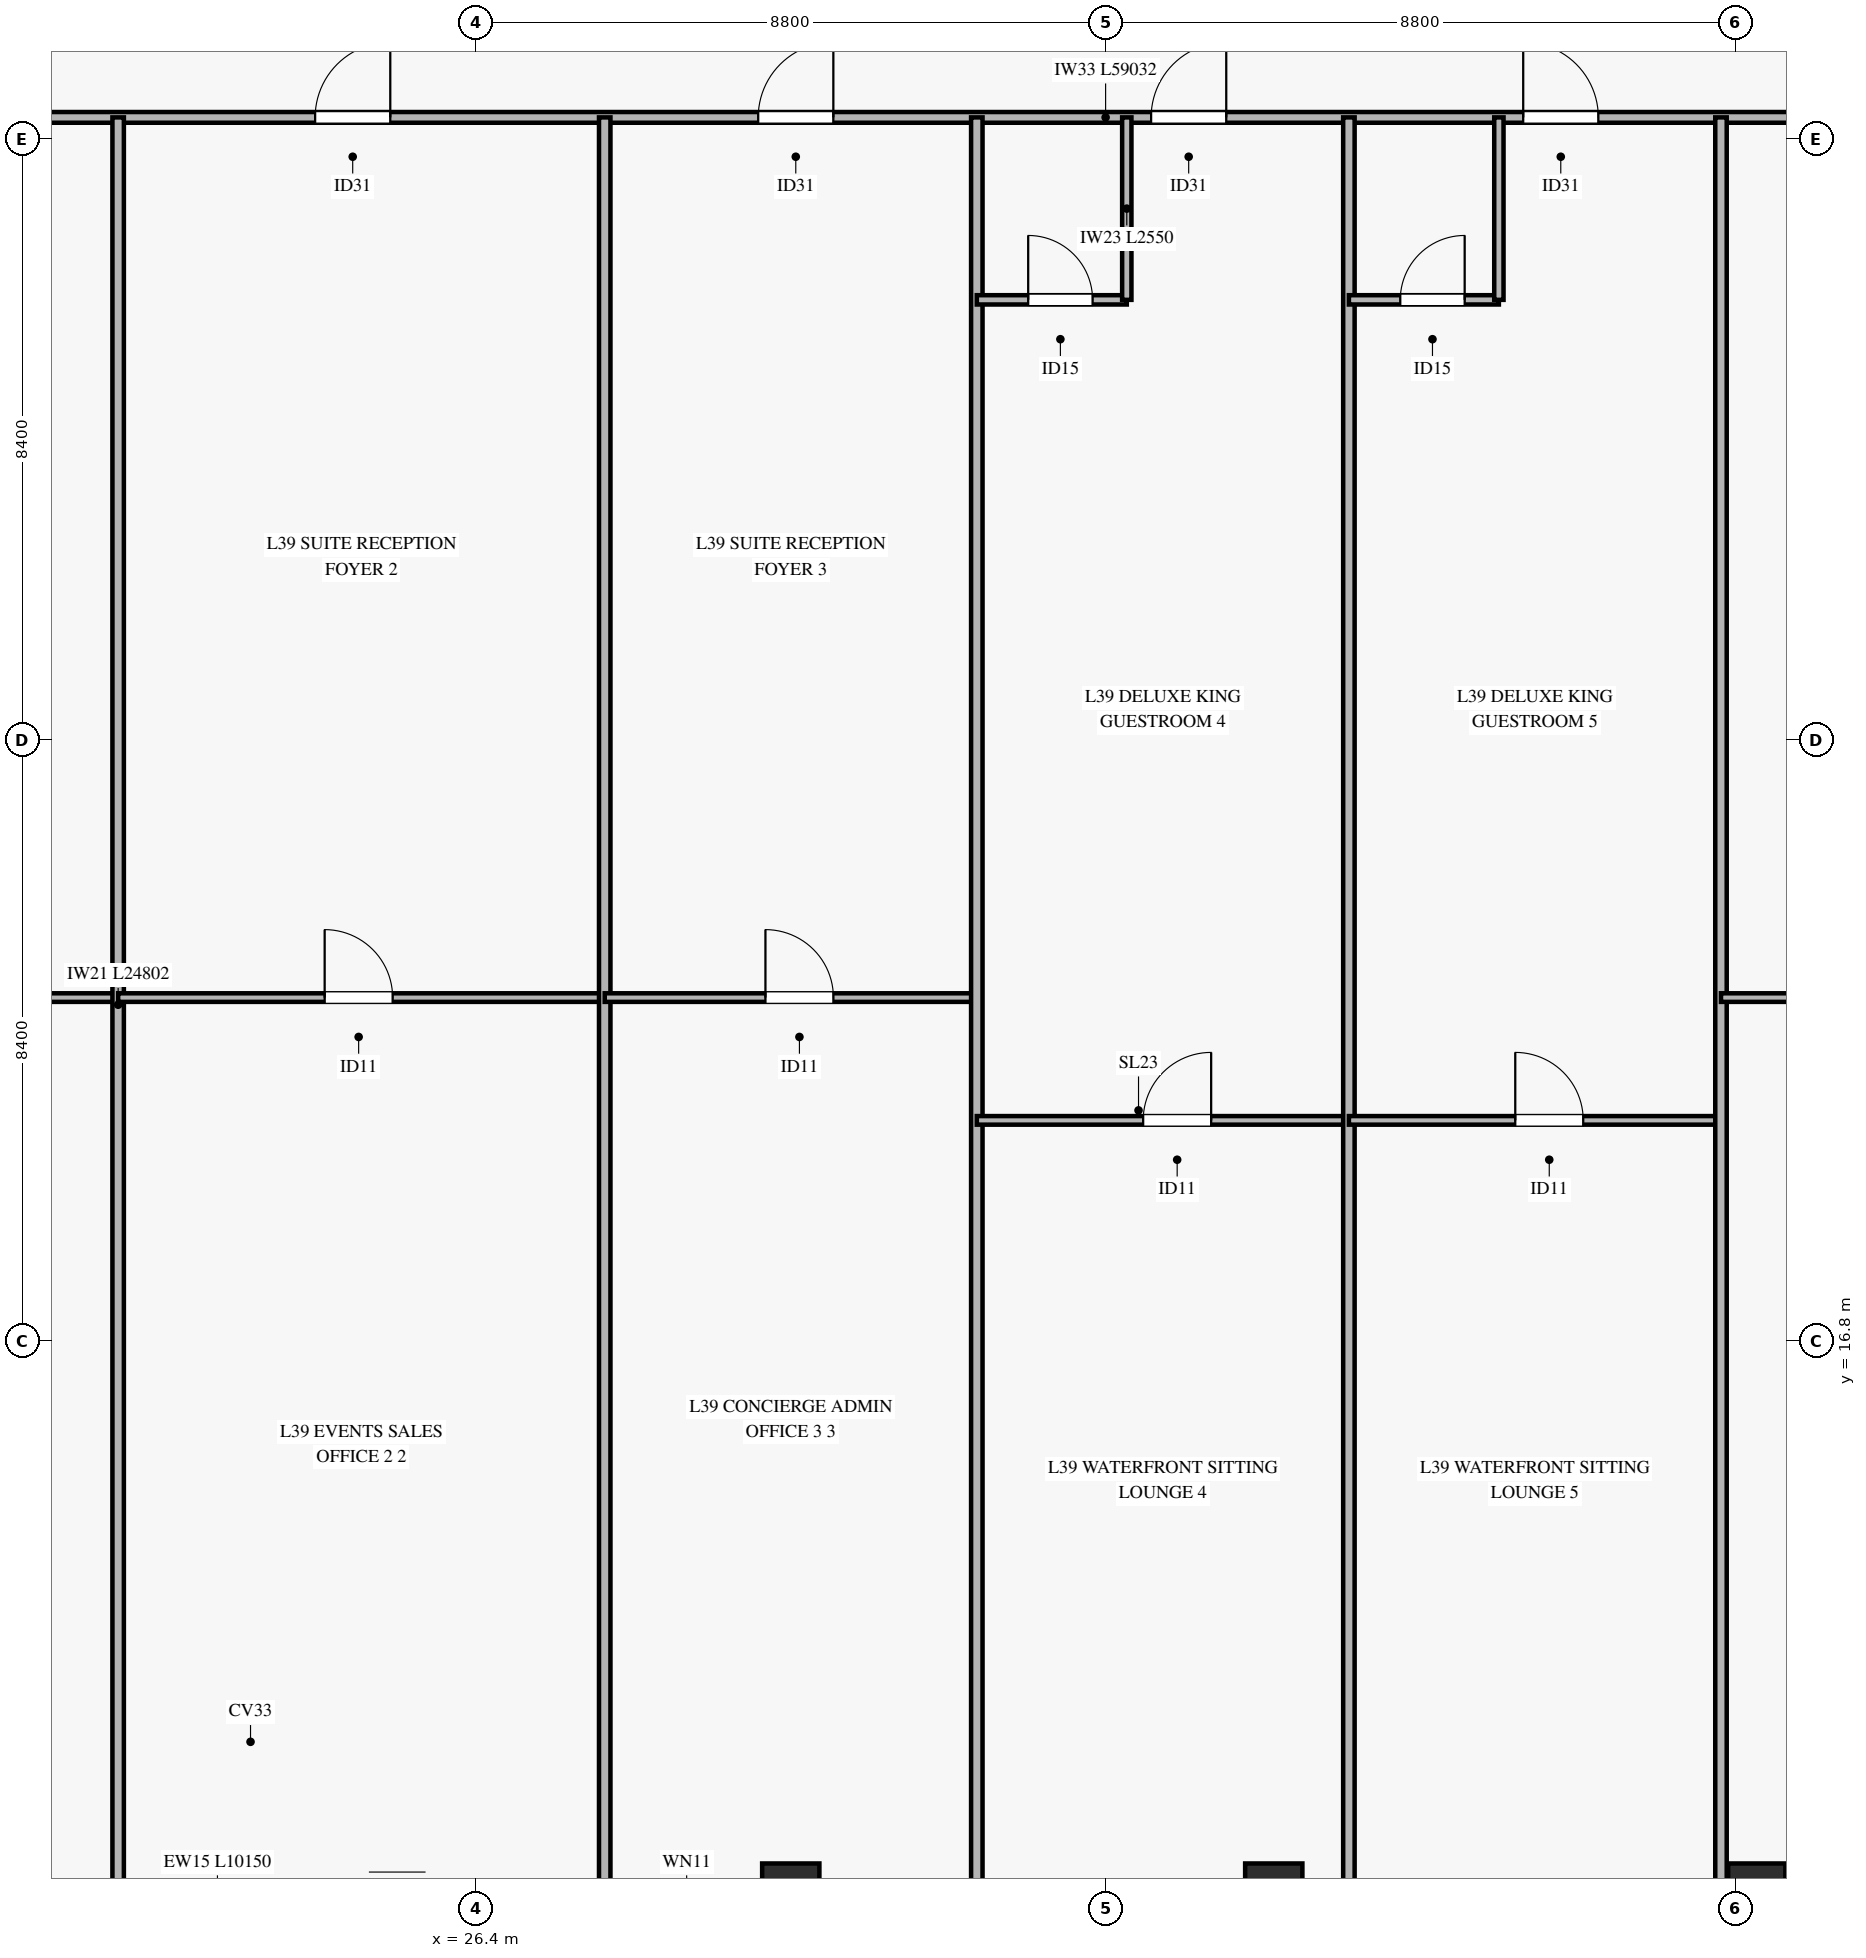
"""IFC4 building model, lengths in metres.
Left out: names, types, materials, properties, quantities, classifications, styles, units other than length and angle.
Written with IfcOpenShell. Run it as: python <this file> out.ifc"""

import sys

from ifc_helpers import new_model, si_unit, direction, frame, frame_2d, origin, origin_2d, place, context, subcontext, project, spatial, rectangle, hollow_rectangle, extrude, source, transform, mapped, element, fill, save


model = new_model("IFC4")
c1 = context("Model", 3, precision=1e-05, world=origin(), true_north=direction((0.0, 1.0)))
c2 = subcontext(c1, "Body", "Model", "MODEL_VIEW")
j1 = project(units=[si_unit("LENGTHUNIT", "METRE"), si_unit("PLANEANGLEUNIT", "RADIAN")], contexts=[c1])
p1 = place(None, origin())
s1 = spatial("IfcSite", under=j1, at=p1, CompositionType="ELEMENT")
p2 = place(p1, origin())
s2 = spatial("IfcBuilding", under=s1, at=p2, CompositionType="ELEMENT")
p3 = place(p2, frame((0.0, 0.0, 159.7)))
s3 = spatial("IfcBuildingStorey", under=s2, at=p3, CompositionType="ELEMENT", Elevation=159.7)
m1 = source(origin(), c2, "Body", "SweptSolid", [
    extrude(hollow_rectangle(XDim=0.8, YDim=0.8, WallThickness=0.036, at=origin_2d()), origin(), (0.0, 0.0, 1.0), 3.27),
])
for number, where, z_axis, x_axis in (
    (1, (30.8, 9.098, 0.0), (0.0, 0.0, 1.0), (1.0, 0.0, 0.0)),
    (2, (37.55, 9.098, 0.0), (0.0, 0.0, 1.0), (1.0, 0.0, 0.0)),
    (3, (44.3, 9.098, 0.0), (0.0, 0.0, 1.0), (1.0, 0.0, 0.0)),
):
    element("IfcColumn", number, at=place(p3, frame(where, z_axis=z_axis, x_axis=x_axis)), inside=s3, PredefinedType="COLUMN", context=c2, shape_type="MappedRepresentation", body=[
        mapped(m1, transform((0.0, 0.0, 0.0), x_axis=(1.0, 0.0, 0.0), y_axis=(0.0, 1.0, 0.0), z_axis=(0.0, 0.0, 1.0), scale=1.0)),
    ])
p4 = place(p3, frame((5.684, 33.9, 0.0), z_axis=(0.0, 0.0, 1.0), x_axis=(1.0, 0.0, 0.0)))
e4 = element("IfcWall", 4, at=p4, inside=s3, PredefinedType="PARTITIONING", context=c2, shape_type="SweptSolid", body=[
    extrude(rectangle(XDim=59.032, YDim=0.15, at=frame_2d((29.516, 0.0))), origin(), (0.0, 0.0, 1.0), 2.455),
])
p5 = place(p4, frame((6.265, 0.0, 0.0)))
e5 = element("IfcOpeningElement", 5, at=p5, cuts=e4, PredefinedType="OPENING", context=c2, shape_type="SweptSolid", body=[
    extrude(rectangle(XDim=1.05, YDim=2.15, at=frame_2d((0.525, 1.075))), frame((0.0, 0.085, 0.0), z_axis=(0.0, -1.0, 0.0), x_axis=(1.0, 0.0, 0.0)), (0.0, 0.0, 1.0), 0.17),
])
p6 = place(p4, frame((18.469, 0.0, 0.0)))
e6 = element("IfcOpeningElement", 6, at=p6, cuts=e4, PredefinedType="OPENING", context=c2, shape_type="SweptSolid", body=[
    extrude(rectangle(XDim=1.05, YDim=2.15, at=frame_2d((0.525, 1.075))), frame((0.0, 0.085, 0.0), z_axis=(0.0, -1.0, 0.0), x_axis=(1.0, 0.0, 0.0)), (0.0, 0.0, 1.0), 0.17),
])
p7 = place(p4, frame((24.661, 0.0, 0.0)))
e7 = element("IfcOpeningElement", 7, at=p7, cuts=e4, PredefinedType="OPENING", context=c2, shape_type="SweptSolid", body=[
    extrude(rectangle(XDim=1.05, YDim=2.15, at=frame_2d((0.525, 1.075))), frame((0.0, 0.085, 0.0), z_axis=(0.0, -1.0, 0.0), x_axis=(1.0, 0.0, 0.0)), (0.0, 0.0, 1.0), 0.17),
])
p8 = place(p4, frame((30.152, 0.0, 0.0)))
e8 = element("IfcOpeningElement", 8, at=p8, cuts=e4, PredefinedType="OPENING", context=c2, shape_type="SweptSolid", body=[
    extrude(rectangle(XDim=1.05, YDim=2.15, at=frame_2d((0.525, 1.075))), frame((0.0, 0.085, 0.0), z_axis=(0.0, -1.0, 0.0), x_axis=(1.0, 0.0, 0.0)), (0.0, 0.0, 1.0), 0.17),
])
p9 = place(p4, frame((35.352, 0.0, 0.0)))
e9 = element("IfcOpeningElement", 9, at=p9, cuts=e4, PredefinedType="OPENING", context=c2, shape_type="SweptSolid", body=[
    extrude(rectangle(XDim=1.05, YDim=2.15, at=frame_2d((0.525, 1.075))), frame((0.0, 0.085, 0.0), z_axis=(0.0, -1.0, 0.0), x_axis=(1.0, 0.0, 0.0)), (0.0, 0.0, 1.0), 0.17),
])
p10 = place(p4, frame((46.157, 0.0, 0.0)))
e10 = element("IfcOpeningElement", 10, at=p10, cuts=e4, PredefinedType="OPENING", context=c2, shape_type="SweptSolid", body=[
    extrude(rectangle(XDim=1.05, YDim=2.15, at=frame_2d((0.525, 1.075))), frame((0.0, 0.085, 0.0), z_axis=(0.0, -1.0, 0.0), x_axis=(1.0, 0.0, 0.0)), (0.0, 0.0, 1.0), 0.17),
])
p11 = place(p3, frame((5.684, 21.599, 0.0), z_axis=(0.0, 0.0, 1.0), x_axis=(1.0, 0.0, 0.0)))
e11 = element("IfcWall", 11, at=p11, inside=s3, PredefinedType="PARTITIONING", context=c2, shape_type="SweptSolid", body=[
    extrude(rectangle(XDim=15.716, YDim=0.12, at=frame_2d((7.858, 0.0))), origin(), (0.0, 0.0, 1.0), 2.455),
])
p12 = place(p11, frame((6.572, 0.0, 0.0)))
e12 = element("IfcOpeningElement", 12, at=p12, cuts=e11, PredefinedType="OPENING", context=c2, shape_type="SweptSolid", body=[
    extrude(rectangle(XDim=0.95, YDim=2.1, at=frame_2d((0.475, 1.05))), frame((0.0, 0.07, 0.0), z_axis=(0.0, -1.0, 0.0), x_axis=(1.0, 0.0, 0.0)), (0.0, 0.0, 1.0), 0.14),
])
p13 = place(p3, frame((21.4, 9.098, 0.0), z_axis=(0.0, 0.0, 1.0), x_axis=(0.0, 1.0, 0.0)))
e13 = element("IfcWall", 13, at=p13, inside=s3, PredefinedType="PARTITIONING", context=c2, shape_type="SweptSolid", body=[
    extrude(rectangle(XDim=24.802, YDim=0.16, at=frame_2d((12.401, 0.0))), origin(), (0.0, 0.0, 1.0), 2.755),
])
p14 = place(p3, frame((21.4, 21.599, 0.0), z_axis=(0.0, 0.0, 1.0), x_axis=(1.0, 0.0, 0.0)))
e14 = element("IfcWall", 14, at=p14, inside=s3, PredefinedType="PARTITIONING", context=c2, shape_type="SweptSolid", body=[
    extrude(rectangle(XDim=6.8, YDim=0.12, at=frame_2d((3.4, 0.0))), origin(), (0.0, 0.0, 1.0), 3.27),
])
p15 = place(p14, frame((2.886, 0.0, 0.0)))
e15 = element("IfcOpeningElement", 15, at=p15, cuts=e14, PredefinedType="OPENING", context=c2, shape_type="SweptSolid", body=[
    extrude(rectangle(XDim=0.95, YDim=2.1, at=frame_2d((0.475, 1.05))), frame((0.0, 0.07, 0.0), z_axis=(0.0, -1.0, 0.0), x_axis=(1.0, 0.0, 0.0)), (0.0, 0.0, 1.0), 0.14),
])
p16 = place(p3, frame((28.2, 9.098, 0.0), z_axis=(0.0, 0.0, 1.0), x_axis=(0.0, 1.0, 0.0)))
e16 = element("IfcWall", 16, at=p16, inside=s3, PredefinedType="PARTITIONING", context=c2, shape_type="SweptSolid", body=[
    extrude(rectangle(XDim=24.802, YDim=0.16, at=frame_2d((12.401, 0.0))), origin(), (0.0, 0.0, 1.0), 2.755),
])
p17 = place(p3, frame((28.2, 21.599, 0.0), z_axis=(0.0, 0.0, 1.0), x_axis=(1.0, 0.0, 0.0)))
e17 = element("IfcWall", 17, at=p17, inside=s3, PredefinedType="PARTITIONING", context=c2, shape_type="SweptSolid", body=[
    extrude(rectangle(XDim=5.2, YDim=0.12, at=frame_2d((2.6, 0.0))), origin(), (0.0, 0.0, 1.0), 2.455),
])
p18 = place(p17, frame((2.246, 0.0, 0.0)))
e18 = element("IfcOpeningElement", 18, at=p18, cuts=e17, PredefinedType="OPENING", context=c2, shape_type="SweptSolid", body=[
    extrude(rectangle(XDim=0.95, YDim=2.1, at=frame_2d((0.475, 1.05))), frame((0.0, 0.07, 0.0), z_axis=(0.0, -1.0, 0.0), x_axis=(1.0, 0.0, 0.0)), (0.0, 0.0, 1.0), 0.14),
])
p19 = place(p3, frame((33.4, 9.098, 0.0), z_axis=(0.0, 0.0, 1.0), x_axis=(0.0, 1.0, 0.0)))
e19 = element("IfcWall", 19, at=p19, inside=s3, PredefinedType="PARTITIONING", context=c2, shape_type="SweptSolid", body=[
    extrude(rectangle(XDim=24.802, YDim=0.16, at=frame_2d((12.401, 0.0))), origin(), (0.0, 0.0, 1.0), 2.755),
])
p20 = place(p3, frame((33.4, 31.35, 0.0), z_axis=(0.0, 0.0, 1.0), x_axis=(1.0, 0.0, 0.0)))
e20 = element("IfcWall", 20, at=p20, inside=s3, PredefinedType="PARTITIONING", context=c2, shape_type="SweptSolid", body=[
    extrude(rectangle(XDim=2.096, YDim=0.13, at=frame_2d((1.048, 0.0))), origin(), (0.0, 0.0, 1.0), 3.27),
])
p21 = place(p20, frame((0.718, 0.0, 0.0)))
e21 = element("IfcOpeningElement", 21, at=p21, cuts=e20, PredefinedType="OPENING", context=c2, shape_type="SweptSolid", body=[
    extrude(rectangle(XDim=0.9, YDim=2.1, at=frame_2d((0.45, 1.05))), frame((0.0, 0.075, 0.0), z_axis=(0.0, -1.0, 0.0), x_axis=(1.0, 0.0, 0.0)), (0.0, 0.0, 1.0), 0.15),
])
p22 = place(p3, frame((35.496, 31.35, 0.0), z_axis=(0.0, 0.0, 1.0), x_axis=(0.0, 1.0, 0.0)))
e22 = element("IfcWall", 22, at=p22, inside=s3, PredefinedType="PARTITIONING", context=c2, shape_type="SweptSolid", body=[
    extrude(rectangle(XDim=2.55, YDim=0.13, at=frame_2d((1.275, 0.0))), origin(), (0.0, 0.0, 1.0), 2.805),
])
p23 = place(p3, frame((33.4, 19.883, 0.0), z_axis=(0.0, 0.0, 1.0), x_axis=(1.0, 0.0, 0.0)))
e23 = element("IfcWall", 23, at=p23, inside=s3, PredefinedType="PARTITIONING", context=c2, shape_type="SweptSolid", body=[
    extrude(rectangle(XDim=5.2, YDim=0.12, at=frame_2d((2.6, 0.0))), origin(), (0.0, 0.0, 1.0), 2.455),
])
p24 = place(p23, frame((2.325, 0.0, 0.0)))
e24 = element("IfcOpeningElement", 24, at=p24, cuts=e23, PredefinedType="OPENING", context=c2, shape_type="SweptSolid", body=[
    extrude(rectangle(XDim=0.95, YDim=2.1, at=frame_2d((0.475, 1.05))), frame((0.0, 0.07, 0.0), z_axis=(0.0, -1.0, 0.0), x_axis=(1.0, 0.0, 0.0)), (0.0, 0.0, 1.0), 0.14),
])
p25 = place(p3, frame((38.6, 9.098, 0.0), z_axis=(0.0, 0.0, 1.0), x_axis=(0.0, 1.0, 0.0)))
e25 = element("IfcWall", 25, at=p25, inside=s3, PredefinedType="PARTITIONING", context=c2, shape_type="SweptSolid", body=[
    extrude(rectangle(XDim=24.802, YDim=0.16, at=frame_2d((12.401, 0.0))), origin(), (0.0, 0.0, 1.0), 2.755),
])
p26 = place(p3, frame((38.6, 31.35, 0.0), z_axis=(0.0, 0.0, 1.0), x_axis=(1.0, 0.0, 0.0)))
e26 = element("IfcWall", 26, at=p26, inside=s3, PredefinedType="PARTITIONING", context=c2, shape_type="SweptSolid", body=[
    extrude(rectangle(XDim=2.096, YDim=0.13, at=frame_2d((1.048, 0.0))), origin(), (0.0, 0.0, 1.0), 3.27),
])
p27 = place(p26, frame((0.718, 0.0, 0.0)))
e27 = element("IfcOpeningElement", 27, at=p27, cuts=e26, PredefinedType="OPENING", context=c2, shape_type="SweptSolid", body=[
    extrude(rectangle(XDim=0.9, YDim=2.1, at=frame_2d((0.45, 1.05))), frame((0.0, 0.075, 0.0), z_axis=(0.0, -1.0, 0.0), x_axis=(1.0, 0.0, 0.0)), (0.0, 0.0, 1.0), 0.15),
])
p28 = place(p3, frame((40.696, 31.35, 0.0), z_axis=(0.0, 0.0, 1.0), x_axis=(0.0, 1.0, 0.0)))
e28 = element("IfcWall", 28, at=p28, inside=s3, PredefinedType="PARTITIONING", context=c2, shape_type="SweptSolid", body=[
    extrude(rectangle(XDim=2.55, YDim=0.13, at=frame_2d((1.275, 0.0))), origin(), (0.0, 0.0, 1.0), 2.805),
])
p29 = place(p3, frame((38.6, 19.883, 0.0), z_axis=(0.0, 0.0, 1.0), x_axis=(1.0, 0.0, 0.0)))
e29 = element("IfcWall", 29, at=p29, inside=s3, PredefinedType="PARTITIONING", context=c2, shape_type="SweptSolid", body=[
    extrude(rectangle(XDim=5.2, YDim=0.12, at=frame_2d((2.6, 0.0))), origin(), (0.0, 0.0, 1.0), 3.27),
])
p30 = place(p29, frame((2.325, 0.0, 0.0)))
e30 = element("IfcOpeningElement", 30, at=p30, cuts=e29, PredefinedType="OPENING", context=c2, shape_type="SweptSolid", body=[
    extrude(rectangle(XDim=0.95, YDim=2.1, at=frame_2d((0.475, 1.05))), frame((0.0, 0.07, 0.0), z_axis=(0.0, -1.0, 0.0), x_axis=(1.0, 0.0, 0.0)), (0.0, 0.0, 1.0), 0.14),
])
p31 = place(p3, frame((43.8, 9.098, 0.0), z_axis=(0.0, 0.0, 1.0), x_axis=(0.0, 1.0, 0.0)))
e31 = element("IfcWall", 31, at=p31, inside=s3, PredefinedType="PARTITIONING", context=c2, shape_type="SweptSolid", body=[
    extrude(rectangle(XDim=24.802, YDim=0.16, at=frame_2d((12.401, 0.0))), origin(), (0.0, 0.0, 1.0), 2.755),
])
p32 = place(p3, frame((43.8, 21.599, 0.0), z_axis=(0.0, 0.0, 1.0), x_axis=(1.0, 0.0, 0.0)))
e32 = element("IfcWall", 32, at=p32, inside=s3, PredefinedType="PARTITIONING", context=c2, shape_type="SweptSolid", body=[
    extrude(rectangle(XDim=20.916, YDim=0.12, at=frame_2d((10.458, 0.0))), origin(), (0.0, 0.0, 1.0), 2.455),
])
p33 = place(p32, frame((8.452, 0.0, 0.0)))
e33 = element("IfcOpeningElement", 33, at=p33, cuts=e32, PredefinedType="OPENING", context=c2, shape_type="SweptSolid", body=[
    extrude(rectangle(XDim=0.95, YDim=2.1, at=frame_2d((0.475, 1.05))), frame((0.0, 0.07, 0.0), z_axis=(0.0, -1.0, 0.0), x_axis=(1.0, 0.0, 0.0)), (0.0, 0.0, 1.0), 0.14),
])
m2 = source(origin(), c2, "Body", "SweptSolid", [
    extrude(rectangle(XDim=1.05, YDim=2.15, at=frame_2d((0.525, 1.075))), frame((0.0, 0.025, 0.0), z_axis=(0.0, -1.0, 0.0), x_axis=(1.0, 0.0, 0.0)), (0.0, 0.0, 1.0), 0.05),
])
p34 = place(p6, origin())
e34 = element("IfcDoor", 34, at=p34, inside=s3, OperationType="SINGLE_SWING_RIGHT", PredefinedType="DOOR", context=c2, shape_type="MappedRepresentation", body=[
    mapped(m2, transform((0.0, 0.0, 0.0), x_axis=(1.0, 0.0, 0.0), y_axis=(0.0, 1.0, 0.0), z_axis=(0.0, 0.0, 1.0), scale=1.0)),
])
fill(e6, e34)
m3 = source(origin(), c2, "Body", "SweptSolid", [
    extrude(rectangle(XDim=0.95, YDim=2.1, at=frame_2d((0.475, 1.05))), frame((0.0, 0.025, 0.0), z_axis=(0.0, -1.0, 0.0), x_axis=(1.0, 0.0, 0.0)), (0.0, 0.0, 1.0), 0.05),
])
p35 = place(p15, origin())
e35 = element("IfcDoor", 35, at=p35, inside=s3, OperationType="SINGLE_SWING_LEFT", PredefinedType="DOOR", context=c2, shape_type="MappedRepresentation", body=[
    mapped(m3, transform((0.0, 0.0, 0.0), x_axis=(1.0, 0.0, 0.0), y_axis=(0.0, 1.0, 0.0), z_axis=(0.0, 0.0, 1.0), scale=1.0)),
])
fill(e15, e35)
p36 = place(p7, origin())
e36 = element("IfcDoor", 36, at=p36, inside=s3, OperationType="SINGLE_SWING_RIGHT", PredefinedType="DOOR", context=c2, shape_type="MappedRepresentation", body=[
    mapped(m2, transform((0.0, 0.0, 0.0), x_axis=(1.0, 0.0, 0.0), y_axis=(0.0, 1.0, 0.0), z_axis=(0.0, 0.0, 1.0), scale=1.0)),
])
fill(e7, e36)
p37 = place(p18, origin())
e37 = element("IfcDoor", 37, at=p37, inside=s3, OperationType="SINGLE_SWING_LEFT", PredefinedType="DOOR", context=c2, shape_type="MappedRepresentation", body=[
    mapped(m3, transform((0.0, 0.0, 0.0), x_axis=(1.0, 0.0, 0.0), y_axis=(0.0, 1.0, 0.0), z_axis=(0.0, 0.0, 1.0), scale=1.0)),
])
fill(e18, e37)
p38 = place(p8, origin())
e38 = element("IfcDoor", 38, at=p38, inside=s3, OperationType="SINGLE_SWING_RIGHT", PredefinedType="DOOR", context=c2, shape_type="MappedRepresentation", body=[
    mapped(m2, transform((0.0, 0.0, 0.0), x_axis=(1.0, 0.0, 0.0), y_axis=(0.0, 1.0, 0.0), z_axis=(0.0, 0.0, 1.0), scale=1.0)),
])
fill(e8, e38)
m4 = source(origin(), c2, "Body", "SweptSolid", [
    extrude(rectangle(XDim=0.9, YDim=2.1, at=frame_2d((0.45, 1.05))), frame((0.0, 0.025, 0.0), z_axis=(0.0, -1.0, 0.0), x_axis=(1.0, 0.0, 0.0)), (0.0, 0.0, 1.0), 0.05),
])
p39 = place(p21, origin())
e39 = element("IfcDoor", 39, at=p39, inside=s3, OperationType="SINGLE_SWING_LEFT", PredefinedType="DOOR", context=c2, shape_type="MappedRepresentation", body=[
    mapped(m4, transform((0.0, 0.0, 0.0), x_axis=(1.0, 0.0, 0.0), y_axis=(0.0, 1.0, 0.0), z_axis=(0.0, 0.0, 1.0), scale=1.0)),
])
fill(e21, e39)
p40 = place(p24, origin())
e40 = element("IfcDoor", 40, at=p40, inside=s3, OperationType="SINGLE_SWING_RIGHT", PredefinedType="DOOR", context=c2, shape_type="MappedRepresentation", body=[
    mapped(m3, transform((0.0, 0.0, 0.0), x_axis=(1.0, 0.0, 0.0), y_axis=(0.0, 1.0, 0.0), z_axis=(0.0, 0.0, 1.0), scale=1.0)),
])
fill(e24, e40)
p41 = place(p9, origin())
e41 = element("IfcDoor", 41, at=p41, inside=s3, OperationType="SINGLE_SWING_LEFT", PredefinedType="DOOR", context=c2, shape_type="MappedRepresentation", body=[
    mapped(m2, transform((0.0, 0.0, 0.0), x_axis=(1.0, 0.0, 0.0), y_axis=(0.0, 1.0, 0.0), z_axis=(0.0, 0.0, 1.0), scale=1.0)),
])
fill(e9, e41)
p42 = place(p27, origin())
e42 = element("IfcDoor", 42, at=p42, inside=s3, OperationType="SINGLE_SWING_RIGHT", PredefinedType="DOOR", context=c2, shape_type="MappedRepresentation", body=[
    mapped(m4, transform((0.0, 0.0, 0.0), x_axis=(1.0, 0.0, 0.0), y_axis=(0.0, 1.0, 0.0), z_axis=(0.0, 0.0, 1.0), scale=1.0)),
])
fill(e27, e42)
p43 = place(p30, origin())
e43 = element("IfcDoor", 43, at=p43, inside=s3, OperationType="SINGLE_SWING_LEFT", PredefinedType="DOOR", context=c2, shape_type="MappedRepresentation", body=[
    mapped(m3, transform((0.0, 0.0, 0.0), x_axis=(1.0, 0.0, 0.0), y_axis=(0.0, 1.0, 0.0), z_axis=(0.0, 0.0, 1.0), scale=1.0)),
])
fill(e30, e43)
save(model, sys.argv[1])
